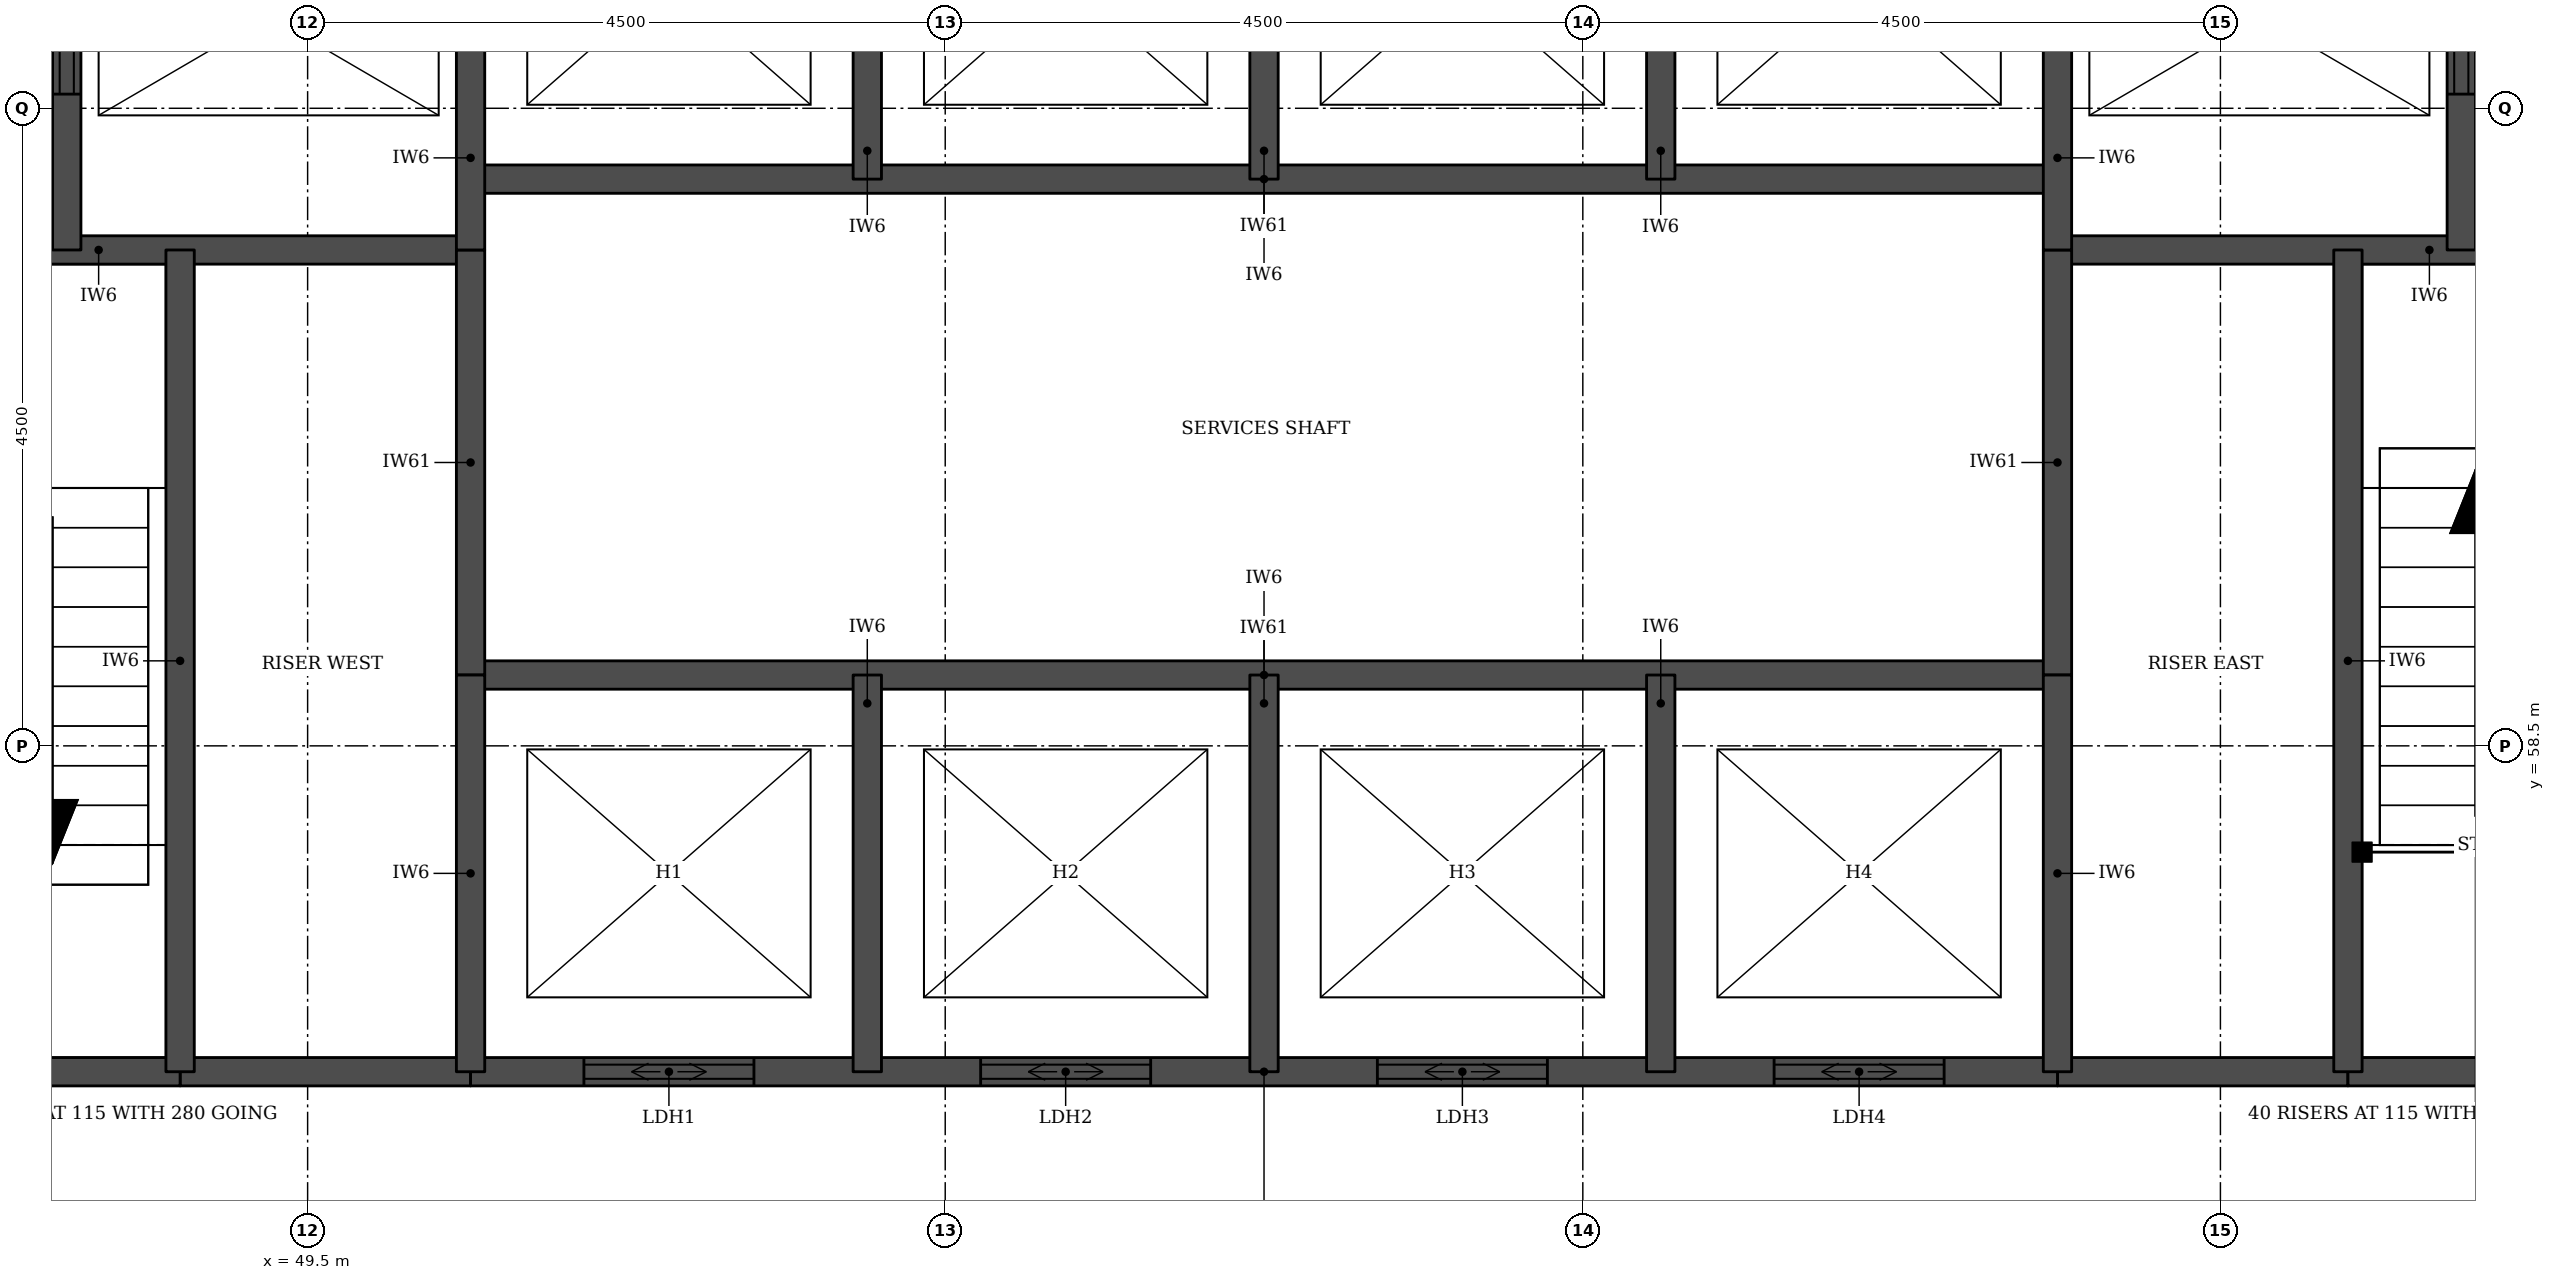
"""IFC4 building model, lengths in metres.
Left out: names, types, materials, properties, quantities, classifications, styles, units other than length and angle.
Written with IfcOpenShell. Run it as: python <this file> out.ifc"""

import sys

from ifc_helpers import new_model, si_unit, direction, frame, frame_2d, origin, place, context, subcontext, project, spatial, rectangle, extrude, element, fill, save


model = new_model("IFC4")
c1 = context("Model", 3, precision=1e-05, world=origin(), true_north=direction((0.0, 1.0)))
c2 = subcontext(c1, "Body", "Model", "MODEL_VIEW")
j1 = project(units=[si_unit("LENGTHUNIT", "METRE"), si_unit("PLANEANGLEUNIT", "RADIAN")], contexts=[c1])
p1 = place(None, origin())
s1 = spatial("IfcSite", under=j1, at=p1, CompositionType="ELEMENT")
p2 = place(p1, origin())
s2 = spatial("IfcBuilding", under=s1, at=p2, CompositionType="ELEMENT")
p3 = place(p2, frame((0.0, 0.0, 143.1)))
s3 = spatial("IfcBuildingStorey", under=s2, at=p3, CompositionType="ELEMENT", Elevation=143.1)
for number, where, z_axis, x_axis in (
    (1, (48.6, 56.2, 0.0), (0.0, 0.0, 1.0), (1.0, 0.0, 0.0)),
    (2, (61.85, 56.2, 0.0), (0.0, 0.0, 1.0), (1.0, 0.0, 0.0)),
):
    element("IfcWall", number, at=place(p3, frame(where, z_axis=z_axis, x_axis=x_axis)), inside=s3, PredefinedType="SOLIDWALL", context=c2, shape_type="SweptSolid", body=[
        extrude(rectangle(XDim=2.05, YDim=0.2, at=frame_2d((1.025, 0.0))), origin(), (0.0, 0.0, 1.0), 4.45),
    ])
p4 = place(p3, frame((45.4, 56.2, 0.0), z_axis=(0.0, 0.0, 1.0), x_axis=(1.0, 0.0, 0.0)))
e3 = element("IfcWall", 3, at=p4, inside=s3, PredefinedType="SOLIDWALL", context=c2, shape_type="SweptSolid", body=[
    extrude(rectangle(XDim=3.2, YDim=0.2, at=frame_2d((1.6, 0.0))), origin(), (0.0, 0.0, 1.0), 4.45),
])
p5 = place(p3, frame((50.65, 56.2, 0.0), z_axis=(0.0, 0.0, 1.0), x_axis=(1.0, 0.0, 0.0)))
e4 = element("IfcWall", 4, at=p5, inside=s3, PredefinedType="SOLIDWALL", context=c2, shape_type="SweptSolid", body=[
    extrude(rectangle(XDim=11.2, YDim=0.2, at=frame_2d((5.6, 0.0))), origin(), (0.0, 0.0, 1.0), 4.45),
])
p6 = place(p5, frame((0.8, 0.0, 0.0)))
e5 = element("IfcOpeningElement", 5, at=p6, cuts=e4, PredefinedType="OPENING", context=c2, shape_type="SweptSolid", body=[
    extrude(rectangle(XDim=1.2, YDim=2.1, at=frame_2d((0.6, 1.05))), frame((0.0, 0.11, 0.0), z_axis=(0.0, -1.0, 0.0), x_axis=(1.0, 0.0, 0.0)), (0.0, 0.0, 1.0), 0.22),
])
p7 = place(p5, frame((3.6, 0.0, 0.0)))
e6 = element("IfcOpeningElement", 6, at=p7, cuts=e4, PredefinedType="OPENING", context=c2, shape_type="SweptSolid", body=[
    extrude(rectangle(XDim=1.2, YDim=2.1, at=frame_2d((0.6, 1.05))), frame((0.0, 0.11, 0.0), z_axis=(0.0, -1.0, 0.0), x_axis=(1.0, 0.0, 0.0)), (0.0, 0.0, 1.0), 0.22),
])
p8 = place(p5, frame((6.4, 0.0, 0.0)))
e7 = element("IfcOpeningElement", 7, at=p8, cuts=e4, PredefinedType="OPENING", context=c2, shape_type="SweptSolid", body=[
    extrude(rectangle(XDim=1.2, YDim=2.1, at=frame_2d((0.6, 1.05))), frame((0.0, 0.11, 0.0), z_axis=(0.0, -1.0, 0.0), x_axis=(1.0, 0.0, 0.0)), (0.0, 0.0, 1.0), 0.22),
])
p9 = place(p5, frame((9.2, 0.0, 0.0)))
e8 = element("IfcOpeningElement", 8, at=p9, cuts=e4, PredefinedType="OPENING", context=c2, shape_type="SweptSolid", body=[
    extrude(rectangle(XDim=1.2, YDim=2.1, at=frame_2d((0.6, 1.05))), frame((0.0, 0.11, 0.0), z_axis=(0.0, -1.0, 0.0), x_axis=(1.0, 0.0, 0.0)), (0.0, 0.0, 1.0), 0.22),
])
p10 = place(p3, frame((63.9, 56.2, 0.0), z_axis=(0.0, 0.0, 1.0), x_axis=(1.0, 0.0, 0.0)))
e9 = element("IfcWall", 9, at=p10, inside=s3, PredefinedType="SOLIDWALL", context=c2, shape_type="SweptSolid", body=[
    extrude(rectangle(XDim=3.2, YDim=0.2, at=frame_2d((1.6, 0.0))), origin(), (0.0, 0.0, 1.0), 4.45),
])
p11 = place(p3, frame((50.65, 59.0, 0.0), z_axis=(0.0, 0.0, 1.0), x_axis=(1.0, 0.0, 0.0)))
e10 = element("IfcWall", 10, at=p11, inside=s3, PredefinedType="SOLIDWALL", context=c2, shape_type="SweptSolid", body=[
    extrude(rectangle(XDim=11.2, YDim=0.2, at=frame_2d((5.6, 0.0))), origin(), (0.0, 0.0, 1.0), 4.6),
])
for number, where, z_axis, x_axis in (
    (11, (45.4, 62.0, 0.0), (0.0, 0.0, 1.0), (1.0, 0.0, 0.0)),
    (12, (61.85, 62.0, 0.0), (0.0, 0.0, 1.0), (1.0, 0.0, 0.0)),
):
    element("IfcWall", number, at=place(p3, frame(where, z_axis=z_axis, x_axis=x_axis)), inside=s3, PredefinedType="SOLIDWALL", context=c2, shape_type="SweptSolid", body=[
        extrude(rectangle(XDim=5.25, YDim=0.2, at=frame_2d((2.625, 0.0))), origin(), (0.0, 0.0, 1.0), 4.45),
    ])
p12 = place(p3, frame((50.65, 62.5, 0.0), z_axis=(0.0, 0.0, 1.0), x_axis=(1.0, 0.0, 0.0)))
e13 = element("IfcWall", 13, at=p12, inside=s3, PredefinedType="SOLIDWALL", context=c2, shape_type="SweptSolid", body=[
    extrude(rectangle(XDim=11.2, YDim=0.2, at=frame_2d((5.6, 0.0))), origin(), (0.0, 0.0, 1.0), 4.6),
])
p13 = place(p3, frame((47.8, 62.0, 0.0), z_axis=(0.0, 0.0, 1.0), x_axis=(0.0, 1.0, 0.0)))
e14 = element("IfcWall", 14, at=p13, inside=s3, PredefinedType="SOLIDWALL", context=c2, shape_type="SweptSolid", body=[
    extrude(rectangle(XDim=3.3, YDim=0.2, at=frame_2d((1.65, 0.0))), origin(), (0.0, 0.0, 1.0), 4.45),
])
p14 = place(p13, frame((1.1, 0.0, 0.0)))
e15 = element("IfcOpeningElement", 15, at=p14, cuts=e14, PredefinedType="OPENING", context=c2, shape_type="SweptSolid", body=[
    extrude(rectangle(XDim=1.1, YDim=2.1, at=frame_2d((0.55, 1.05))), frame((0.0, 0.11, 0.0), z_axis=(0.0, -1.0, 0.0), x_axis=(1.0, 0.0, 0.0)), (0.0, 0.0, 1.0), 0.22),
])
p15 = place(p3, frame((48.6, 56.2, 0.0), z_axis=(0.0, 0.0, 1.0), x_axis=(0.0, 1.0, 0.0)))
e16 = element("IfcWall", 16, at=p15, inside=s3, PredefinedType="SOLIDWALL", context=c2, shape_type="SweptSolid", body=[
    extrude(rectangle(XDim=5.8, YDim=0.2, at=frame_2d((2.9, 0.0))), origin(), (0.0, 0.0, 1.0), 4.45),
])
p16 = place(p3, frame((50.65, 59.0, 0.0), z_axis=(0.0, 0.0, 1.0), x_axis=(0.0, 1.0, 0.0)))
e17 = element("IfcWall", 17, at=p16, inside=s3, PredefinedType="SOLIDWALL", context=c2, shape_type="SweptSolid", body=[
    extrude(rectangle(XDim=3.0, YDim=0.2, at=frame_2d((1.5, 0.0))), origin(), (0.0, 0.0, 1.0), 4.6),
])
p17 = place(p3, frame((50.65, 56.2, 0.0), z_axis=(0.0, 0.0, 1.0), x_axis=(0.0, 1.0, 0.0)))
e18 = element("IfcWall", 18, at=p17, inside=s3, PredefinedType="SOLIDWALL", context=c2, shape_type="SweptSolid", body=[
    extrude(rectangle(XDim=2.8, YDim=0.2, at=frame_2d((1.4, 0.0))), origin(), (0.0, 0.0, 1.0), 4.45),
])
p18 = place(p3, frame((50.65, 62.0, 0.0), z_axis=(0.0, 0.0, 1.0), x_axis=(0.0, 1.0, 0.0)))
e19 = element("IfcWall", 19, at=p18, inside=s3, PredefinedType="SOLIDWALL", context=c2, shape_type="SweptSolid", body=[
    extrude(rectangle(XDim=3.3, YDim=0.2, at=frame_2d((1.65, 0.0))), origin(), (0.0, 0.0, 1.0), 4.45),
])
for number, where, z_axis, x_axis in (
    (20, (53.45, 56.2, 0.0), (0.0, 0.0, 1.0), (0.0, 1.0, 0.0)),
    (21, (53.45, 62.5, 0.0), (0.0, 0.0, 1.0), (0.0, 1.0, 0.0)),
    (22, (56.25, 56.2, 0.0), (0.0, 0.0, 1.0), (0.0, 1.0, 0.0)),
    (23, (56.25, 62.5, 0.0), (0.0, 0.0, 1.0), (0.0, 1.0, 0.0)),
    (24, (59.05, 56.2, 0.0), (0.0, 0.0, 1.0), (0.0, 1.0, 0.0)),
    (25, (59.05, 62.5, 0.0), (0.0, 0.0, 1.0), (0.0, 1.0, 0.0)),
):
    element("IfcWall", number, at=place(p3, frame(where, z_axis=z_axis, x_axis=x_axis)), inside=s3, PredefinedType="SOLIDWALL", context=c2, shape_type="SweptSolid", body=[
        extrude(rectangle(XDim=2.8, YDim=0.2, at=frame_2d((1.4, 0.0))), origin(), (0.0, 0.0, 1.0), 4.45),
    ])
p19 = place(p3, frame((61.85, 59.0, 0.0), z_axis=(0.0, 0.0, 1.0), x_axis=(0.0, 1.0, 0.0)))
e26 = element("IfcWall", 26, at=p19, inside=s3, PredefinedType="SOLIDWALL", context=c2, shape_type="SweptSolid", body=[
    extrude(rectangle(XDim=3.0, YDim=0.2, at=frame_2d((1.5, 0.0))), origin(), (0.0, 0.0, 1.0), 4.6),
])
p20 = place(p3, frame((61.85, 56.2, 0.0), z_axis=(0.0, 0.0, 1.0), x_axis=(0.0, 1.0, 0.0)))
e27 = element("IfcWall", 27, at=p20, inside=s3, PredefinedType="SOLIDWALL", context=c2, shape_type="SweptSolid", body=[
    extrude(rectangle(XDim=2.8, YDim=0.2, at=frame_2d((1.4, 0.0))), origin(), (0.0, 0.0, 1.0), 4.45),
])
p21 = place(p3, frame((61.85, 62.0, 0.0), z_axis=(0.0, 0.0, 1.0), x_axis=(0.0, 1.0, 0.0)))
e28 = element("IfcWall", 28, at=p21, inside=s3, PredefinedType="SOLIDWALL", context=c2, shape_type="SweptSolid", body=[
    extrude(rectangle(XDim=3.3, YDim=0.2, at=frame_2d((1.65, 0.0))), origin(), (0.0, 0.0, 1.0), 4.45),
])
p22 = place(p3, frame((63.9, 56.2, 0.0), z_axis=(0.0, 0.0, 1.0), x_axis=(0.0, 1.0, 0.0)))
e29 = element("IfcWall", 29, at=p22, inside=s3, PredefinedType="SOLIDWALL", context=c2, shape_type="SweptSolid", body=[
    extrude(rectangle(XDim=5.8, YDim=0.2, at=frame_2d((2.9, 0.0))), origin(), (0.0, 0.0, 1.0), 4.45),
])
p23 = place(p3, frame((64.7, 62.0, 0.0), z_axis=(0.0, 0.0, 1.0), x_axis=(0.0, 1.0, 0.0)))
e30 = element("IfcWall", 30, at=p23, inside=s3, PredefinedType="SOLIDWALL", context=c2, shape_type="SweptSolid", body=[
    extrude(rectangle(XDim=3.3, YDim=0.2, at=frame_2d((1.65, 0.0))), origin(), (0.0, 0.0, 1.0), 4.45),
])
p24 = place(p23, frame((1.1, 0.0, 0.0)))
e31 = element("IfcOpeningElement", 31, at=p24, cuts=e30, PredefinedType="OPENING", context=c2, shape_type="SweptSolid", body=[
    extrude(rectangle(XDim=1.1, YDim=2.1, at=frame_2d((0.55, 1.05))), frame((0.0, 0.11, 0.0), z_axis=(0.0, -1.0, 0.0), x_axis=(1.0, 0.0, 0.0)), (0.0, 0.0, 1.0), 0.22),
])
p25 = place(p6, origin())
e32 = element("IfcDoor", 32, at=p25, inside=s3, OperationType="DOUBLE_DOOR_SLIDING", PredefinedType="DOOR", context=c2, shape_type="SweptSolid", body=[
    extrude(rectangle(XDim=1.2, YDim=2.1, at=frame_2d((0.6, 1.05))), frame((0.0, 0.025, 0.0), z_axis=(0.0, -1.0, 0.0), x_axis=(1.0, 0.0, 0.0)), (0.0, 0.0, 1.0), 0.05),
])
fill(e5, e32)
p26 = place(p7, origin())
e33 = element("IfcDoor", 33, at=p26, inside=s3, OperationType="DOUBLE_DOOR_SLIDING", PredefinedType="DOOR", context=c2, shape_type="SweptSolid", body=[
    extrude(rectangle(XDim=1.2, YDim=2.1, at=frame_2d((0.6, 1.05))), frame((0.0, 0.025, 0.0), z_axis=(0.0, -1.0, 0.0), x_axis=(1.0, 0.0, 0.0)), (0.0, 0.0, 1.0), 0.05),
])
fill(e6, e33)
p27 = place(p8, origin())
e34 = element("IfcDoor", 34, at=p27, inside=s3, OperationType="DOUBLE_DOOR_SLIDING", PredefinedType="DOOR", context=c2, shape_type="SweptSolid", body=[
    extrude(rectangle(XDim=1.2, YDim=2.1, at=frame_2d((0.6, 1.05))), frame((0.0, 0.025, 0.0), z_axis=(0.0, -1.0, 0.0), x_axis=(1.0, 0.0, 0.0)), (0.0, 0.0, 1.0), 0.05),
])
fill(e7, e34)
p28 = place(p9, origin())
e35 = element("IfcDoor", 35, at=p28, inside=s3, OperationType="DOUBLE_DOOR_SLIDING", PredefinedType="DOOR", context=c2, shape_type="SweptSolid", body=[
    extrude(rectangle(XDim=1.2, YDim=2.1, at=frame_2d((0.6, 1.05))), frame((0.0, 0.025, 0.0), z_axis=(0.0, -1.0, 0.0), x_axis=(1.0, 0.0, 0.0)), (0.0, 0.0, 1.0), 0.05),
])
fill(e8, e35)
p29 = place(p14, origin())
e36 = element("IfcDoor", 36, at=p29, inside=s3, OperationType="DOUBLE_DOOR_SLIDING", PredefinedType="DOOR", context=c2, shape_type="SweptSolid", body=[
    extrude(rectangle(XDim=1.1, YDim=2.1, at=frame_2d((0.55, 1.05))), frame((0.0, 0.025, 0.0), z_axis=(0.0, -1.0, 0.0), x_axis=(1.0, 0.0, 0.0)), (0.0, 0.0, 1.0), 0.05),
])
fill(e15, e36)
p30 = place(p24, origin())
e37 = element("IfcDoor", 37, at=p30, inside=s3, OperationType="DOUBLE_DOOR_SLIDING", PredefinedType="DOOR", context=c2, shape_type="SweptSolid", body=[
    extrude(rectangle(XDim=1.1, YDim=2.1, at=frame_2d((0.55, 1.05))), frame((0.0, 0.025, 0.0), z_axis=(0.0, -1.0, 0.0), x_axis=(1.0, 0.0, 0.0)), (0.0, 0.0, 1.0), 0.05),
])
fill(e31, e37)
save(model, sys.argv[1])
